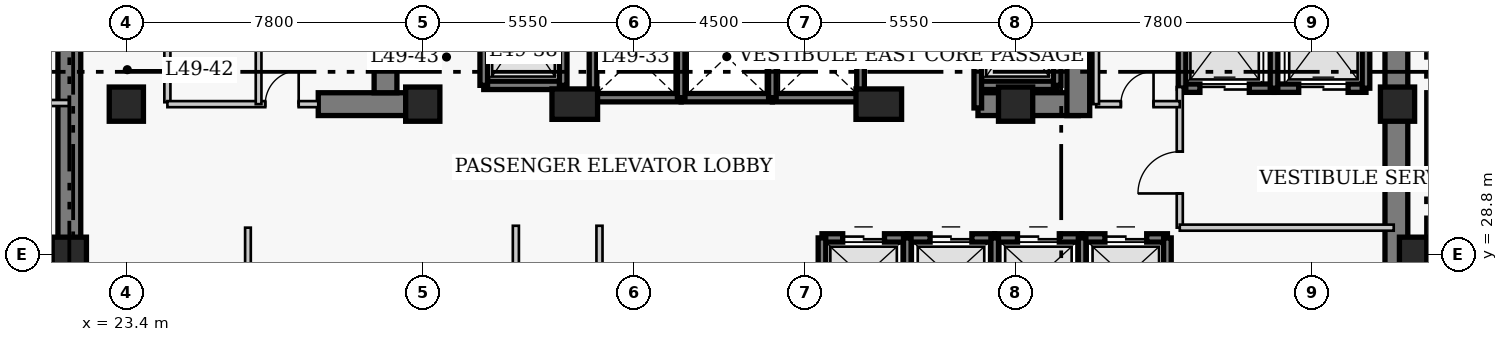
"""IFC4 building model, lengths in metres.
Left out: names, types, materials, properties, quantities, classifications, styles, units other than length and angle.
Written with IfcOpenShell. Run it as: python <this file> out.ifc"""

import sys

from ifc_helpers import new_model, si_unit, direction, frame, frame_2d, origin, origin_2d, place, context, subcontext, project, spatial, rectangle, extrude, element, fill, save


model = new_model("IFC4")
c1 = context("Model", 3, precision=1e-05, world=origin(), true_north=direction((0.0, 1.0)))
c2 = subcontext(c1, "Body", "Model", "MODEL_VIEW")
j1 = project(units=[si_unit("LENGTHUNIT", "METRE"), si_unit("PLANEANGLEUNIT", "RADIAN")], contexts=[c1])
p1 = place(None, origin())
s1 = spatial("IfcSite", under=j1, at=p1, CompositionType="ELEMENT")
p2 = place(p1, origin())
s2 = spatial("IfcBuilding", under=s1, at=p2, CompositionType="ELEMENT")
p3 = place(p2, frame((0.0, 0.0, 196.8)))
s3 = spatial("IfcBuildingStorey", under=s2, at=p3, CompositionType="ELEMENT", Elevation=196.8)
for number, where, z_axis, x_axis in (
    (1, (21.9, 27.05, 0.0), (0.0, 0.0, 1.0), (0.0, 1.0, 0.0)),
    (2, (56.82, 27.05, 0.0), (0.0, 0.0, 1.0), (0.0, 1.0, 0.0)),
):
    element("IfcWall", number, at=place(p3, frame(where, z_axis=z_axis, x_axis=x_axis)), inside=s3, PredefinedType="SHEAR", context=c2, shape_type="SweptSolid", body=[
        extrude(rectangle(XDim=13.57, YDim=0.6, at=frame_2d((6.785, 0.0))), origin(), (0.0, 0.0, 1.0), 3.9),
    ])
p4 = place(p3, frame((28.45, 32.75, 0.0), z_axis=(0.0, 0.0, 1.0), x_axis=(1.0, 0.0, 0.0)))
e3 = element("IfcWall", 3, at=p4, inside=s3, PredefinedType="SHEAR", context=c2, shape_type="SweptSolid", body=[
    extrude(rectangle(XDim=2.4, YDim=0.6, at=frame_2d((1.2, 0.0))), origin(), (0.0, 0.0, 1.0), 3.9),
])
p5 = place(p3, frame((45.81, 32.75, 0.0), z_axis=(0.0, 0.0, 1.0), x_axis=(1.0, 0.0, 0.0)))
e4 = element("IfcWall", 4, at=p5, inside=s3, PredefinedType="SHEAR", context=c2, shape_type="SweptSolid", body=[
    extrude(rectangle(XDim=2.64, YDim=0.6, at=frame_2d((1.32, 0.0))), origin(), (0.0, 0.0, 1.0), 3.9),
])
p6 = place(p3, frame((30.22, 33.05, 0.0), z_axis=(0.0, 0.0, 1.0), x_axis=(0.0, 1.0, 0.0)))
e5 = element("IfcWall", 5, at=p6, inside=s3, PredefinedType="SHEAR", context=c2, shape_type="SweptSolid", body=[
    extrude(rectangle(XDim=7.27, YDim=0.6, at=frame_2d((3.635, 0.0))), origin(), (0.0, 0.0, 1.0), 3.9),
])
p7 = place(p3, frame((48.45, 32.45, 0.0), z_axis=(0.0, 0.0, 1.0), x_axis=(0.0, 1.0, 0.0)))
e6 = element("IfcWall", 6, at=p7, inside=s3, PredefinedType="SHEAR", context=c2, shape_type="SweptSolid", body=[
    extrude(rectangle(XDim=7.87, YDim=0.6, at=frame_2d((3.935, 0.0))), origin(), (0.0, 0.0, 1.0), 3.9),
])
p8 = place(p7, frame((5.75, 0.0, 0.0)))
e7 = element("IfcOpeningElement", 7, at=p8, cuts=e6, PredefinedType="OPENING", context=c2, shape_type="SweptSolid", body=[
    extrude(rectangle(XDim=1.1, YDim=2.15, at=frame_2d((0.55, 1.075))), frame((0.0, 0.31, 0.0), z_axis=(0.0, -1.0, 0.0), x_axis=(1.0, 0.0, 0.0)), (0.0, 0.0, 1.0), 0.62),
])
for number, where, z_axis, x_axis in (
    (8, (21.9, 28.8, 0.0), (0.0, 0.0, 1.0), (1.0, 0.0, 0.0)),
    (9, (57.35, 28.8, 0.0), (0.0, 0.0, 1.0), (1.0, 0.0, 0.0)),
    (10, (23.4, 32.75, 0.0), (0.0, 0.0, 1.0), (1.0, 0.0, 0.0)),
    (11, (31.2, 32.75, 0.0), (0.0, 0.0, 1.0), (1.0, 0.0, 0.0)),
):
    element("IfcColumn", number, at=place(p3, frame(where, z_axis=z_axis, x_axis=x_axis)), inside=s3, PredefinedType="COLUMN", context=c2, shape_type="SweptSolid", body=[
        extrude(rectangle(XDim=0.9, YDim=0.9, at=origin_2d()), origin(), (0.0, 0.0, 1.0), 3.9),
    ])
for number, where, z_axis, x_axis in (
    (12, (35.2, 32.75, 0.0), (0.0, 0.0, 1.0), (1.0, 0.0, 0.0)),
    (13, (43.2, 32.75, 0.0), (0.0, 0.0, 1.0), (1.0, 0.0, 0.0)),
):
    element("IfcColumn", number, at=place(p3, frame(where, z_axis=z_axis, x_axis=x_axis)), inside=s3, PredefinedType="COLUMN", context=c2, shape_type="SweptSolid", body=[
        extrude(rectangle(XDim=1.2, YDim=0.8, at=origin_2d()), origin(), (0.0, 0.0, 1.0), 3.9),
    ])
for number, where, z_axis, x_axis in (
    (14, (46.8, 32.75, 0.0), (0.0, 0.0, 1.0), (1.0, 0.0, 0.0)),
    (15, (56.85, 32.75, 0.0), (0.0, 0.0, 1.0), (1.0, 0.0, 0.0)),
):
    element("IfcColumn", number, at=place(p3, frame(where, z_axis=z_axis, x_axis=x_axis)), inside=s3, PredefinedType="COLUMN", context=c2, shape_type="SweptSolid", body=[
        extrude(rectangle(XDim=0.9, YDim=0.9, at=origin_2d()), origin(), (0.0, 0.0, 1.0), 3.9),
    ])
p9 = place(p3, frame((41.705, 29.23, 0.0), z_axis=(0.0, 0.0, 1.0), x_axis=(1.0, 0.0, 0.0)))
e16 = element("IfcWall", 16, at=p9, inside=s3, PredefinedType="SHEAR", context=c2, shape_type="SweptSolid", body=[
    extrude(rectangle(XDim=2.245, YDim=0.22, at=frame_2d((1.123, 0.0))), origin(), (0.0, 0.0, 1.0), 3.9),
])
p10 = place(p9, frame((0.545, 0.0, 0.0)))
e17 = element("IfcOpeningElement", 17, at=p10, cuts=e16, PredefinedType="OPENING", context=c2, shape_type="SweptSolid", body=[
    extrude(rectangle(XDim=1.1, YDim=2.15, at=frame_2d((0.55, 1.075))), frame((0.0, 0.12, 0.0), z_axis=(0.0, -1.0, 0.0), x_axis=(1.0, 0.0, 0.0)), (0.0, 0.0, 1.0), 0.24),
])
p11 = place(p3, frame((41.705, 27.17, 0.0), z_axis=(0.0, 0.0, 1.0), x_axis=(0.0, 1.0, 0.0)))
e18 = element("IfcWall", 18, at=p11, inside=s3, PredefinedType="SHEAR", context=c2, shape_type="SweptSolid", body=[
    extrude(rectangle(XDim=2.06, YDim=0.2, at=frame_2d((1.03, 0.0))), origin(), (0.0, 0.0, 1.0), 3.9),
])
p12 = place(p3, frame((43.95, 29.23, 0.0), z_axis=(0.0, 0.0, 1.0), x_axis=(1.0, 0.0, 0.0)))
e19 = element("IfcWall", 19, at=p12, inside=s3, PredefinedType="SHEAR", context=c2, shape_type="SweptSolid", body=[
    extrude(rectangle(XDim=2.3, YDim=0.22, at=frame_2d((1.15, 0.0))), origin(), (0.0, 0.0, 1.0), 3.9),
])
p13 = place(p12, frame((0.6, 0.0, 0.0)))
e20 = element("IfcOpeningElement", 20, at=p13, cuts=e19, PredefinedType="OPENING", context=c2, shape_type="SweptSolid", body=[
    extrude(rectangle(XDim=1.1, YDim=2.15, at=frame_2d((0.55, 1.075))), frame((0.0, 0.12, 0.0), z_axis=(0.0, -1.0, 0.0), x_axis=(1.0, 0.0, 0.0)), (0.0, 0.0, 1.0), 0.24),
])
p14 = place(p3, frame((43.95, 27.17, 0.0), z_axis=(0.0, 0.0, 1.0), x_axis=(0.0, 1.0, 0.0)))
e21 = element("IfcWall", 21, at=p14, inside=s3, PredefinedType="SHEAR", context=c2, shape_type="SweptSolid", body=[
    extrude(rectangle(XDim=2.06, YDim=0.2, at=frame_2d((1.03, 0.0))), origin(), (0.0, 0.0, 1.0), 3.9),
])
p15 = place(p3, frame((46.25, 29.23, 0.0), z_axis=(0.0, 0.0, 1.0), x_axis=(1.0, 0.0, 0.0)))
e22 = element("IfcWall", 22, at=p15, inside=s3, PredefinedType="SHEAR", context=c2, shape_type="SweptSolid", body=[
    extrude(rectangle(XDim=2.3, YDim=0.22, at=frame_2d((1.15, 0.0))), origin(), (0.0, 0.0, 1.0), 3.9),
])
p16 = place(p15, frame((0.6, 0.0, 0.0)))
e23 = element("IfcOpeningElement", 23, at=p16, cuts=e22, PredefinedType="OPENING", context=c2, shape_type="SweptSolid", body=[
    extrude(rectangle(XDim=1.1, YDim=2.15, at=frame_2d((0.55, 1.075))), frame((0.0, 0.12, 0.0), z_axis=(0.0, -1.0, 0.0), x_axis=(1.0, 0.0, 0.0)), (0.0, 0.0, 1.0), 0.24),
])
p17 = place(p3, frame((46.25, 27.17, 0.0), z_axis=(0.0, 0.0, 1.0), x_axis=(0.0, 1.0, 0.0)))
e24 = element("IfcWall", 24, at=p17, inside=s3, PredefinedType="SHEAR", context=c2, shape_type="SweptSolid", body=[
    extrude(rectangle(XDim=2.06, YDim=0.2, at=frame_2d((1.03, 0.0))), origin(), (0.0, 0.0, 1.0), 3.9),
])
p18 = place(p3, frame((48.55, 29.23, 0.0), z_axis=(0.0, 0.0, 1.0), x_axis=(1.0, 0.0, 0.0)))
e25 = element("IfcWall", 25, at=p18, inside=s3, PredefinedType="SHEAR", context=c2, shape_type="SweptSolid", body=[
    extrude(rectangle(XDim=2.245, YDim=0.22, at=frame_2d((1.123, 0.0))), origin(), (0.0, 0.0, 1.0), 3.9),
])
p19 = place(p18, frame((0.6, 0.0, 0.0)))
e26 = element("IfcOpeningElement", 26, at=p19, cuts=e25, PredefinedType="OPENING", context=c2, shape_type="SweptSolid", body=[
    extrude(rectangle(XDim=1.1, YDim=2.15, at=frame_2d((0.55, 1.075))), frame((0.0, 0.12, 0.0), z_axis=(0.0, -1.0, 0.0), x_axis=(1.0, 0.0, 0.0)), (0.0, 0.0, 1.0), 0.24),
])
for number, where, z_axis, x_axis in (
    (27, (48.55, 27.17, 0.0), (0.0, 0.0, 1.0), (0.0, 1.0, 0.0)),
    (28, (50.795, 27.17, 0.0), (0.0, 0.0, 1.0), (0.0, 1.0, 0.0)),
):
    element("IfcWall", number, at=place(p3, frame(where, z_axis=z_axis, x_axis=x_axis)), inside=s3, PredefinedType="SHEAR", context=c2, shape_type="SweptSolid", body=[
        extrude(rectangle(XDim=2.06, YDim=0.2, at=frame_2d((1.03, 0.0))), origin(), (0.0, 0.0, 1.0), 3.9),
    ])
p20 = place(p3, frame((35.68, 32.92, 0.0), z_axis=(0.0, 0.0, 1.0), x_axis=(1.0, 0.0, 0.0)))
e29 = element("IfcWall", 29, at=p20, inside=s3, PredefinedType="SHEAR", context=c2, shape_type="SweptSolid", body=[
    extrude(rectangle(XDim=2.32, YDim=0.22, at=frame_2d((1.16, 0.0))), origin(), (0.0, 0.0, 1.0), 3.9),
])
p21 = place(p3, frame((35.68, 32.92, 0.0), z_axis=(0.0, 0.0, 1.0), x_axis=(0.0, 1.0, 0.0)))
e30 = element("IfcWall", 30, at=p21, inside=s3, PredefinedType="SHEAR", context=c2, shape_type="SweptSolid", body=[
    extrude(rectangle(XDim=2.16, YDim=0.2, at=frame_2d((1.08, 0.0))), origin(), (0.0, 0.0, 1.0), 3.9),
])
p22 = place(p3, frame((38.0, 32.92, 0.0), z_axis=(0.0, 0.0, 1.0), x_axis=(1.0, 0.0, 0.0)))
e31 = element("IfcWall", 31, at=p22, inside=s3, PredefinedType="SHEAR", context=c2, shape_type="SweptSolid", body=[
    extrude(rectangle(XDim=2.4, YDim=0.22, at=frame_2d((1.2, 0.0))), origin(), (0.0, 0.0, 1.0), 3.9),
])
p23 = place(p3, frame((38.0, 32.92, 0.0), z_axis=(0.0, 0.0, 1.0), x_axis=(0.0, 1.0, 0.0)))
e32 = element("IfcWall", 32, at=p23, inside=s3, PredefinedType="SHEAR", context=c2, shape_type="SweptSolid", body=[
    extrude(rectangle(XDim=2.16, YDim=0.2, at=frame_2d((1.08, 0.0))), origin(), (0.0, 0.0, 1.0), 3.9),
])
p24 = place(p3, frame((40.4, 32.92, 0.0), z_axis=(0.0, 0.0, 1.0), x_axis=(1.0, 0.0, 0.0)))
e33 = element("IfcWall", 33, at=p24, inside=s3, PredefinedType="SHEAR", context=c2, shape_type="SweptSolid", body=[
    extrude(rectangle(XDim=2.32, YDim=0.22, at=frame_2d((1.16, 0.0))), origin(), (0.0, 0.0, 1.0), 3.9),
])
for number, where, z_axis, x_axis in (
    (34, (40.4, 32.92, 0.0), (0.0, 0.0, 1.0), (0.0, 1.0, 0.0)),
    (35, (42.72, 32.92, 0.0), (0.0, 0.0, 1.0), (0.0, 1.0, 0.0)),
):
    element("IfcWall", number, at=place(p3, frame(where, z_axis=z_axis, x_axis=x_axis)), inside=s3, PredefinedType="SHEAR", context=c2, shape_type="SweptSolid", body=[
        extrude(rectangle(XDim=2.16, YDim=0.2, at=frame_2d((1.08, 0.0))), origin(), (0.0, 0.0, 1.0), 3.9),
    ])
p25 = place(p3, frame((51.18, 33.17, 0.0), z_axis=(0.0, 0.0, 1.0), x_axis=(1.0, 0.0, 0.0)))
e36 = element("IfcWall", 36, at=p25, inside=s3, PredefinedType="SHEAR", context=c2, shape_type="SweptSolid", body=[
    extrude(rectangle(XDim=2.42, YDim=0.22, at=frame_2d((1.21, 0.0))), origin(), (0.0, 0.0, 1.0), 3.9),
])
p26 = place(p25, frame((0.47, 0.0, 0.0)))
e37 = element("IfcOpeningElement", 37, at=p26, cuts=e36, PredefinedType="OPENING", context=c2, shape_type="SweptSolid", body=[
    extrude(rectangle(XDim=1.3, YDim=2.15, at=frame_2d((0.65, 1.075))), frame((0.0, 0.12, 0.0), z_axis=(0.0, -1.0, 0.0), x_axis=(1.0, 0.0, 0.0)), (0.0, 0.0, 1.0), 0.24),
])
p27 = place(p3, frame((51.18, 33.17, 0.0), z_axis=(0.0, 0.0, 1.0), x_axis=(0.0, 1.0, 0.0)))
e38 = element("IfcWall", 38, at=p27, inside=s3, PredefinedType="SHEAR", context=c2, shape_type="SweptSolid", body=[
    extrude(rectangle(XDim=2.86, YDim=0.2, at=frame_2d((1.43, 0.0))), origin(), (0.0, 0.0, 1.0), 3.9),
])
p28 = place(p3, frame((53.6, 33.17, 0.0), z_axis=(0.0, 0.0, 1.0), x_axis=(1.0, 0.0, 0.0)))
e39 = element("IfcWall", 39, at=p28, inside=s3, PredefinedType="SHEAR", context=c2, shape_type="SweptSolid", body=[
    extrude(rectangle(XDim=2.42, YDim=0.22, at=frame_2d((1.21, 0.0))), origin(), (0.0, 0.0, 1.0), 3.9),
])
p29 = place(p28, frame((0.65, 0.0, 0.0)))
e40 = element("IfcOpeningElement", 40, at=p29, cuts=e39, PredefinedType="OPENING", context=c2, shape_type="SweptSolid", body=[
    extrude(rectangle(XDim=1.3, YDim=2.15, at=frame_2d((0.65, 1.075))), frame((0.0, 0.12, 0.0), z_axis=(0.0, -1.0, 0.0), x_axis=(1.0, 0.0, 0.0)), (0.0, 0.0, 1.0), 0.24),
])
for number, where, z_axis, x_axis in (
    (41, (53.6, 33.17, 0.0), (0.0, 0.0, 1.0), (0.0, 1.0, 0.0)),
    (42, (56.02, 33.17, 0.0), (0.0, 0.0, 1.0), (0.0, 1.0, 0.0)),
):
    element("IfcWall", number, at=place(p3, frame(where, z_axis=z_axis, x_axis=x_axis)), inside=s3, PredefinedType="SHEAR", context=c2, shape_type="SweptSolid", body=[
        extrude(rectangle(XDim=2.86, YDim=0.2, at=frame_2d((1.43, 0.0))), origin(), (0.0, 0.0, 1.0), 3.9),
    ])
p30 = place(p3, frame((32.805, 33.245, 0.0), z_axis=(0.0, 0.0, 1.0), x_axis=(1.0, 0.0, 0.0)))
e43 = element("IfcWall", 43, at=p30, inside=s3, PredefinedType="SHEAR", context=c2, shape_type="SweptSolid", body=[
    extrude(rectangle(XDim=2.09, YDim=0.22, at=frame_2d((1.045, 0.0))), origin(), (0.0, 0.0, 1.0), 3.9),
])
for number, where, z_axis, x_axis in (
    (44, (32.805, 33.245, 0.0), (0.0, 0.0, 1.0), (0.0, 1.0, 0.0)),
    (45, (34.895, 33.245, 0.0), (0.0, 0.0, 1.0), (0.0, 1.0, 0.0)),
):
    element("IfcWall", number, at=place(p3, frame(where, z_axis=z_axis, x_axis=x_axis)), inside=s3, PredefinedType="SHEAR", context=c2, shape_type="SweptSolid", body=[
        extrude(rectangle(XDim=2.91, YDim=0.2, at=frame_2d((1.455, 0.0))), origin(), (0.0, 0.0, 1.0), 3.9),
    ])
p31 = place(p3, frame((45.805, 33.245, 0.0), z_axis=(0.0, 0.0, 1.0), x_axis=(1.0, 0.0, 0.0)))
e46 = element("IfcWall", 46, at=p31, inside=s3, PredefinedType="SHEAR", context=c2, shape_type="SweptSolid", body=[
    extrude(rectangle(XDim=2.09, YDim=0.22, at=frame_2d((1.045, 0.0))), origin(), (0.0, 0.0, 1.0), 3.9),
])
p32 = place(p3, frame((45.805, 32.65, 0.0), z_axis=(0.0, 0.0, 1.0), x_axis=(0.0, 1.0, 0.0)))
e47 = element("IfcWall", 47, at=p32, inside=s3, PredefinedType="SHEAR", context=c2, shape_type="SweptSolid", body=[
    extrude(rectangle(XDim=3.505, YDim=0.2, at=frame_2d((1.752, 0.0))), origin(), (0.0, 0.0, 1.0), 3.9),
])
p33 = place(p3, frame((47.895, 33.245, 0.0), z_axis=(0.0, 0.0, 1.0), x_axis=(0.0, 1.0, 0.0)))
e48 = element("IfcWall", 48, at=p33, inside=s3, PredefinedType="SHEAR", context=c2, shape_type="SweptSolid", body=[
    extrude(rectangle(XDim=2.91, YDim=0.2, at=frame_2d((1.455, 0.0))), origin(), (0.0, 0.0, 1.0), 3.9),
])
p34 = place(p3, frame((24.48, 32.8, 0.0), z_axis=(0.0, 0.0, 1.0), x_axis=(0.0, 1.0, 0.0)))
e49 = element("IfcWall", 49, at=p34, inside=s3, PredefinedType="PARTITIONING", context=c2, shape_type="SweptSolid", body=[
    extrude(rectangle(XDim=3.57, YDim=0.16, at=frame_2d((1.785, 0.0))), origin(), (0.0, 0.0, 1.0), 3.65),
])
p35 = place(p34, frame((1.604, 0.0, 0.0)))
e50 = element("IfcOpeningElement", 50, at=p35, cuts=e49, PredefinedType="OPENING", context=c2, shape_type="SweptSolid", body=[
    extrude(rectangle(XDim=0.9, YDim=2.1, at=frame_2d((0.45, 1.05))), frame((0.0, 0.09, 0.0), z_axis=(0.0, -1.0, 0.0), x_axis=(1.0, 0.0, 0.0)), (0.0, 0.0, 1.0), 0.18),
])
p36 = place(p3, frame((51.12, 29.5, 0.0), z_axis=(0.0, 0.0, 1.0), x_axis=(0.0, 1.0, 0.0)))
e51 = element("IfcWall", 51, at=p36, inside=s3, PredefinedType="PARTITIONING", context=c2, shape_type="SweptSolid", body=[
    extrude(rectangle(XDim=3.7, YDim=0.16, at=frame_2d((1.85, 0.0))), origin(), (0.0, 0.0, 1.0), 3.65),
])
p37 = place(p36, frame((0.9, 0.0, 0.0)))
e52 = element("IfcOpeningElement", 52, at=p37, cuts=e51, PredefinedType="OPENING", context=c2, shape_type="SweptSolid", body=[
    extrude(rectangle(XDim=1.1, YDim=2.15, at=frame_2d((0.55, 1.075))), frame((0.0, 0.09, 0.0), z_axis=(0.0, -1.0, 0.0), x_axis=(1.0, 0.0, 0.0)), (0.0, 0.0, 1.0), 0.18),
])
p38 = place(p3, frame((51.12, 29.5, 0.0), z_axis=(0.0, 0.0, 1.0), x_axis=(1.0, 0.0, 0.0)))
e53 = element("IfcWall", 53, at=p38, inside=s3, PredefinedType="PARTITIONING", context=c2, shape_type="SweptSolid", body=[
    extrude(rectangle(XDim=5.63, YDim=0.16, at=frame_2d((2.815, 0.0))), origin(), (0.0, 0.0, 1.0), 3.65),
])
p39 = place(p3, frame((24.48, 32.75, 0.0), z_axis=(0.0, 0.0, 1.0), x_axis=(1.0, 0.0, 0.0)))
e54 = element("IfcWall", 54, at=p39, inside=s3, PredefinedType="PARTITIONING", context=c2, shape_type="SweptSolid", body=[
    extrude(rectangle(XDim=3.97, YDim=0.16, at=frame_2d((1.985, 0.0))), origin(), (0.0, 0.0, 1.0), 3.65),
])
p40 = place(p39, frame((2.575, 0.0, 0.0)))
e55 = element("IfcOpeningElement", 55, at=p40, cuts=e54, PredefinedType="OPENING", context=c2, shape_type="SweptSolid", body=[
    extrude(rectangle(XDim=0.88, YDim=2.05, at=frame_2d((0.44, 1.025))), frame((0.0, 0.09, 0.0), z_axis=(0.0, -1.0, 0.0), x_axis=(1.0, 0.0, 0.0)), (0.0, 0.0, 1.0), 0.18),
])
p41 = place(p3, frame((48.92, 32.75, 0.0), z_axis=(0.0, 0.0, 1.0), x_axis=(1.0, 0.0, 0.0)))
e56 = element("IfcWall", 56, at=p41, inside=s3, PredefinedType="PARTITIONING", context=c2, shape_type="SweptSolid", body=[
    extrude(rectangle(XDim=2.2, YDim=0.16, at=frame_2d((1.1, 0.0))), origin(), (0.0, 0.0, 1.0), 3.65),
])
p42 = place(p41, frame((0.65, 0.0, 0.0)))
e57 = element("IfcOpeningElement", 57, at=p42, cuts=e56, PredefinedType="OPENING", context=c2, shape_type="SweptSolid", body=[
    extrude(rectangle(XDim=0.86, YDim=2.05, at=frame_2d((0.43, 1.025))), frame((0.0, 0.09, 0.0), z_axis=(0.0, -1.0, 0.0), x_axis=(1.0, 0.0, 0.0)), (0.0, 0.0, 1.0), 0.18),
])
for number, where, z_axis, x_axis in (
    (58, (48.92, 32.75, 0.0), (0.0, 0.0, 1.0), (0.0, 1.0, 0.0)),
    (59, (26.88, 32.75, 0.0), (0.0, 0.0, 1.0), (0.0, 1.0, 0.0)),
):
    element("IfcWall", number, at=place(p3, frame(where, z_axis=z_axis, x_axis=x_axis)), inside=s3, PredefinedType="PARTITIONING", context=c2, shape_type="SweptSolid", body=[
        extrude(rectangle(XDim=3.62, YDim=0.15, at=frame_2d((1.81, 0.0))), origin(), (0.0, 0.0, 1.0), 3.65),
    ])
for number, where, z_axis, x_axis in (
    (60, (33.65, 17.26, 0.0), (0.0, 0.0, 1.0), (0.0, 1.0, 0.0)),
    (61, (35.85, 17.26, 0.0), (0.0, 0.0, 1.0), (0.0, 1.0, 0.0)),
):
    element("IfcWall", number, at=place(p3, frame(where, z_axis=z_axis, x_axis=x_axis)), inside=s3, PredefinedType="PARTITIONING", context=c2, shape_type="SweptSolid", body=[
        extrude(rectangle(XDim=12.29, YDim=0.16, at=frame_2d((6.145, 0.0))), origin(), (0.0, 0.0, 1.0), 3.65),
    ])
p43 = place(p3, frame((20.46, 32.78, 0.0), z_axis=(0.0, 0.0, 1.0), x_axis=(1.0, 0.0, 0.0)))
e62 = element("IfcWall", 62, at=p43, inside=s3, PredefinedType="PARTITIONING", context=c2, shape_type="SweptSolid", body=[
    extrude(rectangle(XDim=1.44, YDim=0.16, at=frame_2d((0.72, 0.0))), origin(), (0.0, 0.0, 1.0), 3.65),
])
p44 = place(p3, frame((26.6, 17.26, 0.0), z_axis=(0.0, 0.0, 1.0), x_axis=(0.0, 1.0, 0.0)))
e63 = element("IfcWall", 63, at=p44, inside=s3, PredefinedType="PARTITIONING", context=c2, shape_type="SweptSolid", body=[
    extrude(rectangle(XDim=12.24, YDim=0.15, at=frame_2d((6.12, 0.0))), origin(), (0.0, 0.0, 1.0), 3.65),
])
p45 = place(p10, origin())
e64 = element("IfcDoor", 64, at=p45, inside=s3, OperationType="DOUBLE_DOOR_SLIDING", PredefinedType="DOOR", context=c2, shape_type="SweptSolid", body=[
    extrude(rectangle(XDim=1.1, YDim=2.15, at=frame_2d((0.55, 1.075))), frame((0.0, 0.025, 0.0), z_axis=(0.0, -1.0, 0.0), x_axis=(1.0, 0.0, 0.0)), (0.0, 0.0, 1.0), 0.05),
])
fill(e17, e64)
p46 = place(p13, origin())
e65 = element("IfcDoor", 65, at=p46, inside=s3, OperationType="DOUBLE_DOOR_SLIDING", PredefinedType="DOOR", context=c2, shape_type="SweptSolid", body=[
    extrude(rectangle(XDim=1.1, YDim=2.15, at=frame_2d((0.55, 1.075))), frame((0.0, 0.025, 0.0), z_axis=(0.0, -1.0, 0.0), x_axis=(1.0, 0.0, 0.0)), (0.0, 0.0, 1.0), 0.05),
])
fill(e20, e65)
p47 = place(p16, origin())
e66 = element("IfcDoor", 66, at=p47, inside=s3, OperationType="DOUBLE_DOOR_SLIDING", PredefinedType="DOOR", context=c2, shape_type="SweptSolid", body=[
    extrude(rectangle(XDim=1.1, YDim=2.15, at=frame_2d((0.55, 1.075))), frame((0.0, 0.025, 0.0), z_axis=(0.0, -1.0, 0.0), x_axis=(1.0, 0.0, 0.0)), (0.0, 0.0, 1.0), 0.05),
])
fill(e23, e66)
p48 = place(p19, origin())
e67 = element("IfcDoor", 67, at=p48, inside=s3, OperationType="DOUBLE_DOOR_SLIDING", PredefinedType="DOOR", context=c2, shape_type="SweptSolid", body=[
    extrude(rectangle(XDim=1.1, YDim=2.15, at=frame_2d((0.55, 1.075))), frame((0.0, 0.025, 0.0), z_axis=(0.0, -1.0, 0.0), x_axis=(1.0, 0.0, 0.0)), (0.0, 0.0, 1.0), 0.05),
])
fill(e26, e67)
p49 = place(p26, origin())
e68 = element("IfcDoor", 68, at=p49, inside=s3, OperationType="DOUBLE_DOOR_SLIDING", PredefinedType="DOOR", context=c2, shape_type="SweptSolid", body=[
    extrude(rectangle(XDim=1.3, YDim=2.15, at=frame_2d((0.65, 1.075))), frame((0.0, 0.025, 0.0), z_axis=(0.0, -1.0, 0.0), x_axis=(1.0, 0.0, 0.0)), (0.0, 0.0, 1.0), 0.05),
])
fill(e37, e68)
p50 = place(p29, origin())
e69 = element("IfcDoor", 69, at=p50, inside=s3, OperationType="DOUBLE_DOOR_SLIDING", PredefinedType="DOOR", context=c2, shape_type="SweptSolid", body=[
    extrude(rectangle(XDim=1.3, YDim=2.15, at=frame_2d((0.65, 1.075))), frame((0.0, 0.025, 0.0), z_axis=(0.0, -1.0, 0.0), x_axis=(1.0, 0.0, 0.0)), (0.0, 0.0, 1.0), 0.05),
])
fill(e40, e69)
p51 = place(p37, origin())
e70 = element("IfcDoor", 70, at=p51, inside=s3, OperationType="SINGLE_SWING_LEFT", PredefinedType="DOOR", context=c2, shape_type="SweptSolid", body=[
    extrude(rectangle(XDim=1.1, YDim=2.15, at=frame_2d((0.55, 1.075))), frame((0.0, 0.025, 0.0), z_axis=(0.0, -1.0, 0.0), x_axis=(1.0, 0.0, 0.0)), (0.0, 0.0, 1.0), 0.05),
])
fill(e52, e70)
p52 = place(p40, origin())
e71 = element("IfcDoor", 71, at=p52, inside=s3, OperationType="SINGLE_SWING_RIGHT", PredefinedType="DOOR", context=c2, shape_type="SweptSolid", body=[
    extrude(rectangle(XDim=0.88, YDim=2.05, at=frame_2d((0.44, 1.025))), frame((0.0, 0.025, 0.0), z_axis=(0.0, -1.0, 0.0), x_axis=(1.0, 0.0, 0.0)), (0.0, 0.0, 1.0), 0.05),
])
fill(e55, e71)
p53 = place(p42, origin())
e72 = element("IfcDoor", 72, at=p53, inside=s3, OperationType="SINGLE_SWING_RIGHT", PredefinedType="DOOR", context=c2, shape_type="SweptSolid", body=[
    extrude(rectangle(XDim=0.86, YDim=2.05, at=frame_2d((0.43, 1.025))), frame((0.0, 0.025, 0.0), z_axis=(0.0, -1.0, 0.0), x_axis=(1.0, 0.0, 0.0)), (0.0, 0.0, 1.0), 0.05),
])
fill(e57, e72)
save(model, sys.argv[1])
